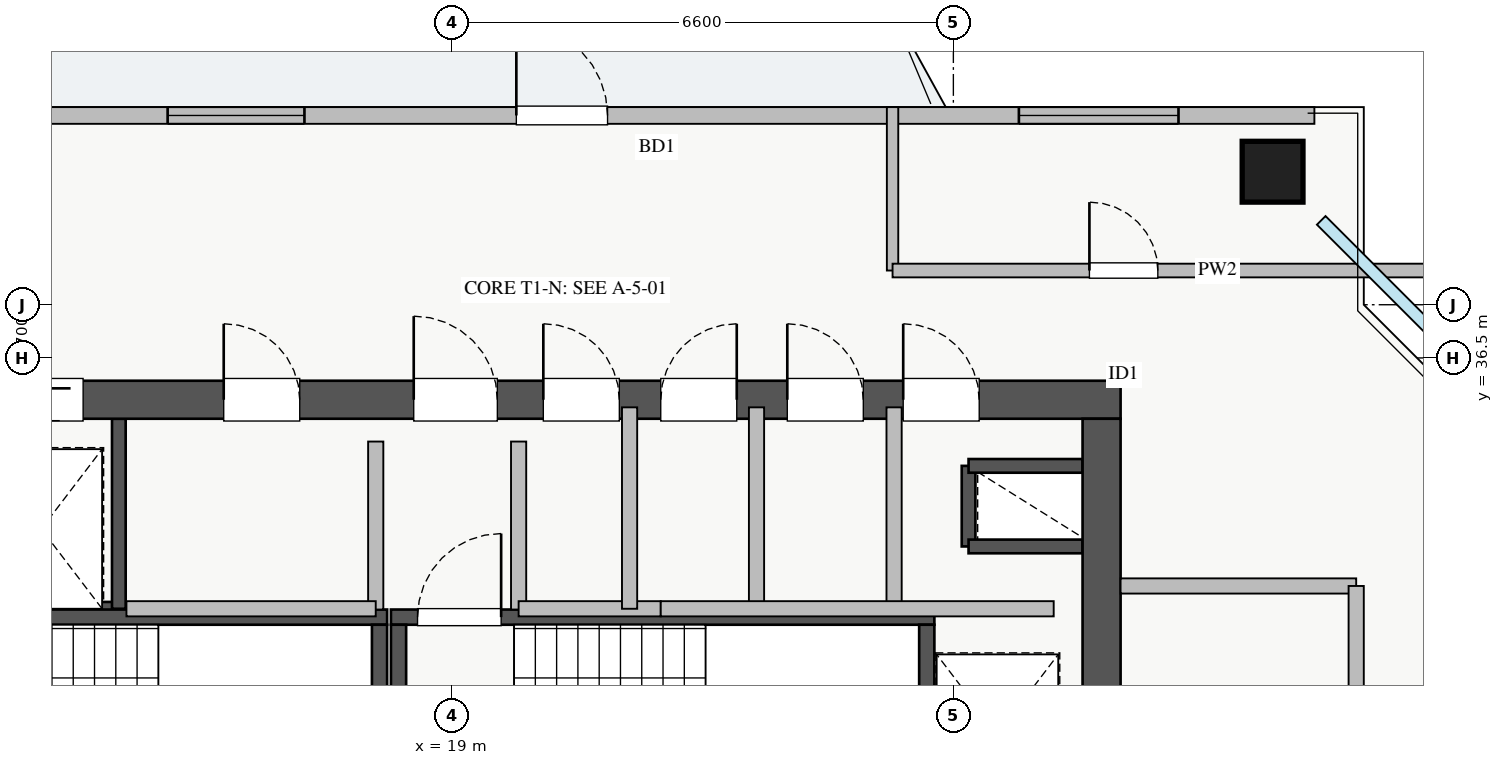
"""IFC4 building model, lengths in metres.
Left out: names, types, materials, properties, quantities, classifications, styles, units other than length and angle.
Written with IfcOpenShell. Run it as: python <this file> out.ifc"""

import sys

from ifc_helpers import new_model, si_unit, direction, frame, frame_2d, origin, origin_2d, place, context, subcontext, project, spatial, rectangle, extrude, source, transform, mapped, element, fill, save


model = new_model("IFC4")
c1 = context("Model", 3, precision=1e-05, world=origin(), true_north=direction((0.0, 1.0)))
c2 = subcontext(c1, "Body", "Model", "MODEL_VIEW")
j1 = project(units=[si_unit("LENGTHUNIT", "METRE"), si_unit("PLANEANGLEUNIT", "RADIAN")], contexts=[c1])
p1 = place(None, origin())
s1 = spatial("IfcSite", under=j1, at=p1, CompositionType="ELEMENT")
p2 = place(p1, origin())
s2 = spatial("IfcBuilding", under=s1, at=p2, CompositionType="ELEMENT")
p3 = place(p2, frame((0.0, 0.0, 203.5)))
s3 = spatial("IfcBuildingStorey", under=s2, at=p3, CompositionType="ELEMENT", Elevation=203.5)
p4 = place(p3, frame((12.68, 33.2, 0.0), z_axis=(0.0, 0.0, 1.0), x_axis=(1.0, 0.0, 0.0)))
e1 = element("IfcWall", 1, at=p4, inside=s3, PredefinedType="SHEAR", context=c2, shape_type="SweptSolid", body=[
    extrude(rectangle(XDim=1.94, YDim=0.18, at=frame_2d((0.97, 0.0))), origin(), (0.0, 0.0, 1.0), 3.07),
])
p5 = place(p3, frame((14.62, 33.2, 0.0), z_axis=(0.0, 0.0, 1.0), x_axis=(0.0, 1.0, 0.0)))
e2 = element("IfcWall", 2, at=p5, inside=s3, PredefinedType="SHEAR", context=c2, shape_type="SweptSolid", body=[
    extrude(rectangle(XDim=2.5, YDim=0.18, at=frame_2d((1.25, 0.0))), origin(), (0.0, 0.0, 1.0), 3.07),
])
p6 = place(p3, frame((25.8, 34.02, 0.0), z_axis=(0.0, 0.0, 1.0), x_axis=(0.0, 1.0, 0.0)))
e3 = element("IfcWall", 3, at=p6, inside=s3, PredefinedType="SHEAR", context=c2, shape_type="SweptSolid", body=[
    extrude(rectangle(XDim=1.06, YDim=0.18, at=frame_2d((0.53, 0.0))), origin(), (0.0, 0.0, 1.0), 3.07),
])
for number, where, z_axis, x_axis in (
    (4, (25.8, 35.08, 0.0), (0.0, 0.0, 1.0), (1.0, 0.0, 0.0)),
    (5, (25.8, 34.02, 0.0), (0.0, 0.0, 1.0), (1.0, 0.0, 0.0)),
):
    element("IfcWall", number, at=place(p3, frame(where, z_axis=z_axis, x_axis=x_axis)), inside=s3, PredefinedType="SHEAR", context=c2, shape_type="SweptSolid", body=[
        extrude(rectangle(XDim=1.5, YDim=0.18, at=frame_2d((0.75, 0.0))), origin(), (0.0, 0.0, 1.0), 3.07),
    ])
p7 = place(p3, frame((10.7, 33.09, 0.0), z_axis=(0.0, 0.0, 1.0), x_axis=(1.0, 0.0, 0.0)))
e6 = element("IfcWall", 6, at=p7, inside=s3, PredefinedType="SHEAR", context=c2, shape_type="SweptSolid", body=[
    extrude(rectangle(XDim=7.45, YDim=0.2, at=frame_2d((3.725, 0.0))), origin(), (0.0, 0.0, 1.0), 3.25),
])
p8 = place(p7, frame((0.35, 0.0, 0.0)))
e7 = element("IfcOpeningElement", 7, at=p8, cuts=e6, PredefinedType="OPENING", context=c2, shape_type="SweptSolid", body=[
    extrude(rectangle(XDim=1.1, YDim=2.05, at=frame_2d((0.55, 1.025))), frame((0.0, 0.11, 0.0), z_axis=(0.0, -1.0, 0.0), x_axis=(1.0, 0.0, 0.0)), (0.0, 0.0, 1.0), 0.22),
])
p9 = place(p3, frame((18.05, 30.05, 0.0), z_axis=(0.0, 0.0, 1.0), x_axis=(0.0, 1.0, 0.0)))
e8 = element("IfcWall", 8, at=p9, inside=s3, PredefinedType="SHEAR", context=c2, shape_type="SweptSolid", body=[
    extrude(rectangle(XDim=2.94, YDim=0.2, at=frame_2d((1.47, 0.0))), origin(), (0.0, 0.0, 1.0), 3.25),
])
p10 = place(p3, frame((18.2, 33.09, 0.0), z_axis=(0.0, 0.0, 1.0), x_axis=(1.0, 0.0, 0.0)))
e9 = element("IfcWall", 9, at=p10, inside=s3, PredefinedType="SHEAR", context=c2, shape_type="SweptSolid", body=[
    extrude(rectangle(XDim=7.15, YDim=0.2, at=frame_2d((3.575, 0.0))), origin(), (0.0, 0.0, 1.0), 3.25),
])
p11 = place(p10, frame((0.35, 0.0, 0.0)))
e10 = element("IfcOpeningElement", 10, at=p11, cuts=e9, PredefinedType="OPENING", context=c2, shape_type="SweptSolid", body=[
    extrude(rectangle(XDim=1.1, YDim=2.05, at=frame_2d((0.55, 1.025))), frame((0.0, 0.11, 0.0), z_axis=(0.0, -1.0, 0.0), x_axis=(1.0, 0.0, 0.0)), (0.0, 0.0, 1.0), 0.22),
])
for number, where, z_axis, x_axis in (
    (11, (18.3, 30.05, 0.0), (0.0, 0.0, 1.0), (0.0, 1.0, 0.0)),
    (12, (25.25, 30.05, 0.0), (0.0, 0.0, 1.0), (0.0, 1.0, 0.0)),
):
    element("IfcWall", number, at=place(p3, frame(where, z_axis=z_axis, x_axis=x_axis)), inside=s3, PredefinedType="SHEAR", context=c2, shape_type="SweptSolid", body=[
        extrude(rectangle(XDim=2.94, YDim=0.2, at=frame_2d((1.47, 0.0))), origin(), (0.0, 0.0, 1.0), 3.25),
    ])
p12 = place(p3, frame((10.2, 35.95, 0.0), z_axis=(0.0, 0.0, 1.0), x_axis=(1.0, 0.0, 0.0)))
e13 = element("IfcWall", 13, at=p12, inside=s3, PredefinedType="SHEAR", context=c2, shape_type="SweptSolid", body=[
    extrude(rectangle(XDim=17.6, YDim=0.5, at=frame_2d((8.8, 0.0))), origin(), (0.0, 0.0, 1.0), 3.25),
])
p13 = place(p12, frame((1.15, 0.0, 0.0)))
e14 = element("IfcOpeningElement", 14, at=p13, cuts=e13, PredefinedType="OPENING", context=c2, shape_type="SweptSolid", body=[
    extrude(rectangle(XDim=1.1, YDim=2.05, at=frame_2d((0.55, 1.025))), frame((0.0, 0.26, 0.0), z_axis=(0.0, -1.0, 0.0), x_axis=(1.0, 0.0, 0.0)), (0.0, 0.0, 1.0), 0.52),
])
p14 = place(p12, frame((8.3, 0.0, 0.0)))
e15 = element("IfcOpeningElement", 15, at=p14, cuts=e13, PredefinedType="OPENING", context=c2, shape_type="SweptSolid", body=[
    extrude(rectangle(XDim=1.1, YDim=2.05, at=frame_2d((0.55, 1.025))), frame((0.0, 0.26, 0.0), z_axis=(0.0, -1.0, 0.0), x_axis=(1.0, 0.0, 0.0)), (0.0, 0.0, 1.0), 0.52),
])
p15 = place(p12, frame((2.85, 0.0, 0.0)))
e16 = element("IfcOpeningElement", 16, at=p15, cuts=e13, PredefinedType="OPENING", context=c2, shape_type="SweptSolid", body=[
    extrude(rectangle(XDim=1.1, YDim=2.05, at=frame_2d((0.55, 1.025))), frame((0.0, 0.26, 0.0), z_axis=(0.0, -1.0, 0.0), x_axis=(1.0, 0.0, 0.0)), (0.0, 0.0, 1.0), 0.52),
])
p16 = place(p12, frame((5.8, 0.0, 0.0)))
e17 = element("IfcOpeningElement", 17, at=p16, cuts=e13, PredefinedType="OPENING", context=c2, shape_type="SweptSolid", body=[
    extrude(rectangle(XDim=1.0, YDim=2.05, at=frame_2d((0.5, 1.025))), frame((0.0, 0.26, 0.0), z_axis=(0.0, -1.0, 0.0), x_axis=(1.0, 0.0, 0.0)), (0.0, 0.0, 1.0), 0.52),
])
p17 = place(p12, frame((14.74, 0.0, 0.0)))
e18 = element("IfcOpeningElement", 18, at=p17, cuts=e13, PredefinedType="OPENING", context=c2, shape_type="SweptSolid", body=[
    extrude(rectangle(XDim=1.0, YDim=2.05, at=frame_2d((0.5, 1.025))), frame((0.0, 0.26, 0.0), z_axis=(0.0, -1.0, 0.0), x_axis=(1.0, 0.0, 0.0)), (0.0, 0.0, 1.0), 0.52),
])
p18 = place(p12, frame((10.005, 0.0, 0.0)))
e19 = element("IfcOpeningElement", 19, at=p18, cuts=e13, PredefinedType="OPENING", context=c2, shape_type="SweptSolid", body=[
    extrude(rectangle(XDim=1.0, YDim=2.05, at=frame_2d((0.5, 1.025))), frame((0.0, 0.26, 0.0), z_axis=(0.0, -1.0, 0.0), x_axis=(1.0, 0.0, 0.0)), (0.0, 0.0, 1.0), 0.52),
])
p19 = place(p12, frame((11.55, 0.0, 0.0)))
e20 = element("IfcOpeningElement", 20, at=p19, cuts=e13, PredefinedType="OPENING", context=c2, shape_type="SweptSolid", body=[
    extrude(rectangle(XDim=1.0, YDim=2.05, at=frame_2d((0.5, 1.025))), frame((0.0, 0.26, 0.0), z_axis=(0.0, -1.0, 0.0), x_axis=(1.0, 0.0, 0.0)), (0.0, 0.0, 1.0), 0.52),
])
p20 = place(p12, frame((13.215, 0.0, 0.0)))
e21 = element("IfcOpeningElement", 21, at=p20, cuts=e13, PredefinedType="OPENING", context=c2, shape_type="SweptSolid", body=[
    extrude(rectangle(XDim=1.0, YDim=2.05, at=frame_2d((0.5, 1.025))), frame((0.0, 0.26, 0.0), z_axis=(0.0, -1.0, 0.0), x_axis=(1.0, 0.0, 0.0)), (0.0, 0.0, 1.0), 0.52),
])
p21 = place(p3, frame((27.55, 29.5, 0.0), z_axis=(0.0, 0.0, 1.0), x_axis=(0.0, 1.0, 0.0)))
e22 = element("IfcWall", 22, at=p21, inside=s3, PredefinedType="SHEAR", context=c2, shape_type="SweptSolid", body=[
    extrude(rectangle(XDim=6.2, YDim=0.5, at=frame_2d((3.1, 0.0))), origin(), (0.0, 0.0, 1.0), 3.25),
])
p22 = place(p21, frame((1.1, 0.0, 0.0)))
e23 = element("IfcOpeningElement", 23, at=p22, cuts=e22, PredefinedType="OPENING", context=c2, shape_type="SweptSolid", body=[
    extrude(rectangle(XDim=1.3, YDim=2.05, at=frame_2d((0.65, 1.025))), frame((0.0, 0.26, 0.0), z_axis=(0.0, -1.0, 0.0), x_axis=(1.0, 0.0, 0.0)), (0.0, 0.0, 1.0), 0.52),
])
m1 = source(origin(), c2, "Body", "SweptSolid", [
    extrude(rectangle(XDim=0.8, YDim=0.8, at=origin_2d()), origin(), (0.0, 0.0, 1.0), 3.25),
])
p23 = place(p3, frame((29.8, 38.95, 0.0), z_axis=(0.0, 0.0, 1.0), x_axis=(1.0, 0.0, 0.0)))
e24 = element("IfcColumn", 24, at=p23, inside=s3, PredefinedType="COLUMN", context=c2, shape_type="MappedRepresentation", body=[
    mapped(m1, transform((0.0, 0.0, 0.0), x_axis=(1.0, 0.0, 0.0), y_axis=(0.0, 1.0, 0.0), z_axis=(0.0, 0.0, 1.0), scale=1.0)),
])
p24 = place(p3, frame((7.65, 39.69, 0.0), z_axis=(0.0, 0.0, 1.0), x_axis=(1.0, 0.0, 0.0)))
e25 = element("IfcWall", 25, at=p24, inside=s3, PredefinedType="STANDARD", context=c2, shape_type="SweptSolid", body=[
    extrude(rectangle(XDim=22.7, YDim=0.22, at=frame_2d((11.35, 0.0))), origin(), (0.0, 0.0, 1.0), 2.61),
])
p25 = place(p24, frame((12.2, 0.0, 0.0)))
e26 = element("IfcOpeningElement", 26, at=p25, cuts=e25, PredefinedType="OPENING", context=c2, shape_type="SweptSolid", body=[
    extrude(rectangle(XDim=1.2, YDim=2.1, at=frame_2d((0.6, 1.05))), frame((0.0, 0.12, 0.0), z_axis=(0.0, -1.0, 0.0), x_axis=(1.0, 0.0, 0.0)), (0.0, 0.0, 1.0), 0.24),
])
p26 = place(p24, frame((1.637, 0.0, 0.9)))
e27 = element("IfcOpeningElement", 27, at=p26, cuts=e25, PredefinedType="OPENING", context=c2, shape_type="SweptSolid", body=[
    extrude(rectangle(XDim=2.4, YDim=1.48, at=frame_2d((1.2, 0.74))), frame((0.0, 0.12, 0.0), z_axis=(0.0, -1.0, 0.0), x_axis=(1.0, 0.0, 0.0)), (0.0, 0.0, 1.0), 0.24),
])
p27 = place(p24, frame((7.612, 0.0, 0.9)))
e28 = element("IfcOpeningElement", 28, at=p27, cuts=e25, PredefinedType="OPENING", context=c2, shape_type="SweptSolid", body=[
    extrude(rectangle(XDim=1.8, YDim=1.45, at=frame_2d((0.9, 0.725))), frame((0.0, 0.12, 0.0), z_axis=(0.0, -1.0, 0.0), x_axis=(1.0, 0.0, 0.0)), (0.0, 0.0, 1.0), 0.24),
])
p28 = place(p24, frame((18.812, 0.0, 0.9)))
e29 = element("IfcOpeningElement", 29, at=p28, cuts=e25, PredefinedType="OPENING", context=c2, shape_type="SweptSolid", body=[
    extrude(rectangle(XDim=2.1, YDim=1.48, at=frame_2d((1.05, 0.74))), frame((0.0, 0.12, 0.0), z_axis=(0.0, -1.0, 0.0), x_axis=(1.0, 0.0, 0.0)), (0.0, 0.0, 1.0), 0.24),
])
p29 = place(p3, frame((27.8, 33.5, 0.0), z_axis=(0.0, 0.0, 1.0), x_axis=(1.0, 0.0, 0.0)))
e30 = element("IfcWall", 30, at=p29, inside=s3, PredefinedType="PARTITIONING", context=c2, shape_type="SweptSolid", body=[
    extrude(rectangle(XDim=3.1, YDim=0.2, at=frame_2d((1.55, 0.0))), origin(), (0.0, 0.0, 1.0), 2.265),
])
p30 = place(p3, frame((30.9, 29.6, 0.0), z_axis=(0.0, 0.0, 1.0), x_axis=(0.0, 1.0, 0.0)))
e31 = element("IfcWall", 31, at=p30, inside=s3, PredefinedType="PARTITIONING", context=c2, shape_type="SweptSolid", body=[
    extrude(rectangle(XDim=3.9, YDim=0.2, at=frame_2d((1.95, 0.0))), origin(), (0.0, 0.0, 1.0), 3.07),
])
p31 = place(p30, frame((1.4, 0.0, 0.0)))
e32 = element("IfcOpeningElement", 32, at=p31, cuts=e31, PredefinedType="OPENING", context=c2, shape_type="SweptSolid", body=[
    extrude(rectangle(XDim=1.1, YDim=2.05, at=frame_2d((0.55, 1.025))), frame((0.0, 0.11, 0.0), z_axis=(0.0, -1.0, 0.0), x_axis=(1.0, 0.0, 0.0)), (0.0, 0.0, 1.0), 0.22),
])
for number, where, z_axis, x_axis in (
    (33, (18.0, 33.19, 0.0), (0.0, 0.0, 1.0), (0.0, 1.0, 0.0)),
    (34, (19.88, 33.19, 0.0), (0.0, 0.0, 1.0), (0.0, 1.0, 0.0)),
):
    element("IfcWall", number, at=place(p3, frame(where, z_axis=z_axis, x_axis=x_axis)), inside=s3, PredefinedType="PARTITIONING", context=c2, shape_type="SweptSolid", body=[
        extrude(rectangle(XDim=2.21, YDim=0.2, at=frame_2d((1.105, 0.0))), origin(), (0.0, 0.0, 1.0), 3.07),
    ])
p32 = place(p3, frame((14.72, 33.2, 0.0), z_axis=(0.0, 0.0, 1.0), x_axis=(1.0, 0.0, 0.0)))
e35 = element("IfcWall", 35, at=p32, inside=s3, PredefinedType="PARTITIONING", context=c2, shape_type="SweptSolid", body=[
    extrude(rectangle(XDim=3.28, YDim=0.2, at=frame_2d((1.64, 0.0))), origin(), (0.0, 0.0, 1.0), 3.07),
])
p33 = place(p3, frame((24.82, 33.2, 0.0), z_axis=(0.0, 0.0, 1.0), x_axis=(0.0, 1.0, 0.0)))
e36 = element("IfcWall", 36, at=p33, inside=s3, PredefinedType="PARTITIONING", context=c2, shape_type="SweptSolid", body=[
    extrude(rectangle(XDim=2.65, YDim=0.2, at=frame_2d((1.325, 0.0))), origin(), (0.0, 0.0, 1.0), 3.07),
])
p34 = place(p3, frame((19.88, 33.2, 0.0), z_axis=(0.0, 0.0, 1.0), x_axis=(1.0, 0.0, 0.0)))
e37 = element("IfcWall", 37, at=p34, inside=s3, PredefinedType="PARTITIONING", context=c2, shape_type="SweptSolid", body=[
    extrude(rectangle(XDim=1.87, YDim=0.2, at=frame_2d((0.935, 0.0))), origin(), (0.0, 0.0, 1.0), 3.07),
])
for number, where, z_axis, x_axis in (
    (38, (21.34, 33.2, 0.0), (0.0, 0.0, 1.0), (0.0, 1.0, 0.0)),
    (39, (23.01, 33.2, 0.0), (0.0, 0.0, 1.0), (0.0, 1.0, 0.0)),
):
    element("IfcWall", number, at=place(p3, frame(where, z_axis=z_axis, x_axis=x_axis)), inside=s3, PredefinedType="PARTITIONING", context=c2, shape_type="SweptSolid", body=[
        extrude(rectangle(XDim=2.65, YDim=0.2, at=frame_2d((1.325, 0.0))), origin(), (0.0, 0.0, 1.0), 3.07),
    ])
p35 = place(p3, frame((21.75, 33.2, 0.0), z_axis=(0.0, 0.0, 1.0), x_axis=(1.0, 0.0, 0.0)))
e40 = element("IfcWall", 40, at=p35, inside=s3, PredefinedType="PARTITIONING", context=c2, shape_type="SweptSolid", body=[
    extrude(rectangle(XDim=5.17, YDim=0.2, at=frame_2d((2.585, 0.0))), origin(), (0.0, 0.0, 1.0), 3.07),
])
p36 = place(p3, frame((24.8, 37.65, 0.0), z_axis=(0.0, 0.0, 1.0), x_axis=(0.0, 1.0, 0.0)))
e41 = element("IfcWall", 41, at=p36, inside=s3, PredefinedType="PARTITIONING", context=c2, shape_type="SweptSolid", body=[
    extrude(rectangle(XDim=2.15, YDim=0.15, at=frame_2d((1.075, 0.0))), origin(), (0.0, 0.0, 1.0), 3.07),
])
p37 = place(p3, frame((24.8, 37.65, 0.0), z_axis=(0.0, 0.0, 1.0), x_axis=(1.0, 0.0, 0.0)))
e42 = element("IfcWall", 42, at=p37, inside=s3, PredefinedType="PARTITIONING", context=c2, shape_type="SweptSolid", body=[
    extrude(rectangle(XDim=7.65, YDim=0.18, at=frame_2d((3.825, 0.0))), origin(), (0.0, 0.0, 1.0), 3.07),
])
p38 = place(p37, frame((2.59, 0.0, 0.0)))
e43 = element("IfcOpeningElement", 43, at=p38, cuts=e42, PredefinedType="OPENING", context=c2, shape_type="SweptSolid", body=[
    extrude(rectangle(XDim=0.9, YDim=2.05, at=frame_2d((0.45, 1.025))), frame((0.0, 0.1, 0.0), z_axis=(0.0, -1.0, 0.0), x_axis=(1.0, 0.0, 0.0)), (0.0, 0.0, 1.0), 0.2),
])
m2 = source(origin(), c2, "Body", "SweptSolid", [
    extrude(rectangle(XDim=1.2, YDim=2.1, at=frame_2d((0.6, 1.05))), frame((0.0, 0.025, 0.0), z_axis=(0.0, -1.0, 0.0), x_axis=(1.0, 0.0, 0.0)), (0.0, 0.0, 1.0), 0.05),
])
p39 = place(p25, origin())
e44 = element("IfcDoor", 44, at=p39, inside=s3, OperationType="SINGLE_SWING_LEFT", PredefinedType="DOOR", context=c2, shape_type="MappedRepresentation", body=[
    mapped(m2, transform((0.0, 0.0, 0.0), x_axis=(1.0, 0.0, 0.0), y_axis=(0.0, 1.0, 0.0), z_axis=(0.0, 0.0, 1.0), scale=1.0)),
])
fill(e26, e44)
m3 = source(origin(), c2, "Body", "SweptSolid", [
    extrude(rectangle(XDim=1.8, YDim=1.45, at=frame_2d((0.9, 0.725))), frame((0.0, 0.03, 0.0), z_axis=(0.0, -1.0, 0.0), x_axis=(1.0, 0.0, 0.0)), (0.0, 0.0, 1.0), 0.06),
])
p40 = place(p27, origin())
e45 = element("IfcWindow", 45, at=p40, inside=s3, PartitioningType="DOUBLE_PANEL_VERTICAL", PredefinedType="WINDOW", context=c2, shape_type="MappedRepresentation", body=[
    mapped(m3, transform((0.0, 0.0, 0.0), x_axis=(1.0, 0.0, 0.0), y_axis=(0.0, 1.0, 0.0), z_axis=(0.0, 0.0, 1.0), scale=1.0)),
])
fill(e28, e45)
m4 = source(origin(), c2, "Body", "SweptSolid", [
    extrude(rectangle(XDim=2.1, YDim=1.48, at=frame_2d((1.05, 0.74))), frame((0.0, 0.03, 0.0), z_axis=(0.0, -1.0, 0.0), x_axis=(1.0, 0.0, 0.0)), (0.0, 0.0, 1.0), 0.06),
])
p41 = place(p28, origin())
e46 = element("IfcWindow", 46, at=p41, inside=s3, PartitioningType="TRIPLE_PANEL_VERTICAL", PredefinedType="WINDOW", context=c2, shape_type="MappedRepresentation", body=[
    mapped(m4, transform((0.0, 0.0, 0.0), x_axis=(1.0, 0.0, 0.0), y_axis=(0.0, 1.0, 0.0), z_axis=(0.0, 0.0, 1.0), scale=1.0)),
])
fill(e29, e46)
m5 = source(origin(), c2, "Body", "SweptSolid", [
    extrude(rectangle(XDim=1.1, YDim=2.05, at=frame_2d((0.55, 1.025))), frame((0.0, 0.025, 0.0), z_axis=(0.0, -1.0, 0.0), x_axis=(1.0, 0.0, 0.0)), (0.0, 0.0, 1.0), 0.05),
])
p42 = place(p14, origin())
e47 = element("IfcDoor", 47, at=p42, inside=s3, OperationType="SINGLE_SWING_LEFT", PredefinedType="DOOR", context=c2, shape_type="MappedRepresentation", body=[
    mapped(m5, transform((0.0, 0.0, 0.0), x_axis=(1.0, 0.0, 0.0), y_axis=(0.0, 1.0, 0.0), z_axis=(0.0, 0.0, 1.0), scale=1.0)),
])
fill(e15, e47)
p43 = place(p11, origin())
e48 = element("IfcDoor", 48, at=p43, inside=s3, OperationType="SINGLE_SWING_RIGHT", PredefinedType="DOOR", context=c2, shape_type="MappedRepresentation", body=[
    mapped(m5, transform((0.0, 0.0, 0.0), x_axis=(1.0, 0.0, 0.0), y_axis=(0.0, 1.0, 0.0), z_axis=(0.0, 0.0, 1.0), scale=1.0)),
])
fill(e10, e48)
p44 = place(p15, origin())
e49 = element("IfcDoor", 49, at=p44, inside=s3, OperationType="SLIDING_TO_LEFT", PredefinedType="DOOR", context=c2, shape_type="MappedRepresentation", body=[
    mapped(m5, transform((0.0, 0.0, 0.0), x_axis=(1.0, 0.0, 0.0), y_axis=(0.0, 1.0, 0.0), z_axis=(0.0, 0.0, 1.0), scale=1.0)),
])
fill(e16, e49)
m6 = source(origin(), c2, "Body", "SweptSolid", [
    extrude(rectangle(XDim=1.0, YDim=2.05, at=frame_2d((0.5, 1.025))), frame((0.0, 0.025, 0.0), z_axis=(0.0, -1.0, 0.0), x_axis=(1.0, 0.0, 0.0)), (0.0, 0.0, 1.0), 0.05),
])
p45 = place(p16, origin())
e50 = element("IfcDoor", 50, at=p45, inside=s3, OperationType="SINGLE_SWING_LEFT", PredefinedType="DOOR", context=c2, shape_type="MappedRepresentation", body=[
    mapped(m6, transform((0.0, 0.0, 0.0), x_axis=(1.0, 0.0, 0.0), y_axis=(0.0, 1.0, 0.0), z_axis=(0.0, 0.0, 1.0), scale=1.0)),
])
fill(e17, e50)
p46 = place(p17, origin())
e51 = element("IfcDoor", 51, at=p46, inside=s3, OperationType="SINGLE_SWING_LEFT", PredefinedType="DOOR", context=c2, shape_type="MappedRepresentation", body=[
    mapped(m6, transform((0.0, 0.0, 0.0), x_axis=(1.0, 0.0, 0.0), y_axis=(0.0, 1.0, 0.0), z_axis=(0.0, 0.0, 1.0), scale=1.0)),
])
fill(e18, e51)
p47 = place(p18, origin())
e52 = element("IfcDoor", 52, at=p47, inside=s3, OperationType="SINGLE_SWING_LEFT", PredefinedType="DOOR", context=c2, shape_type="MappedRepresentation", body=[
    mapped(m6, transform((0.0, 0.0, 0.0), x_axis=(1.0, 0.0, 0.0), y_axis=(0.0, 1.0, 0.0), z_axis=(0.0, 0.0, 1.0), scale=1.0)),
])
fill(e19, e52)
p48 = place(p19, origin())
e53 = element("IfcDoor", 53, at=p48, inside=s3, OperationType="SINGLE_SWING_RIGHT", PredefinedType="DOOR", context=c2, shape_type="MappedRepresentation", body=[
    mapped(m6, transform((0.0, 0.0, 0.0), x_axis=(1.0, 0.0, 0.0), y_axis=(0.0, 1.0, 0.0), z_axis=(0.0, 0.0, 1.0), scale=1.0)),
])
fill(e20, e53)
p49 = place(p20, origin())
e54 = element("IfcDoor", 54, at=p49, inside=s3, OperationType="SINGLE_SWING_LEFT", PredefinedType="DOOR", context=c2, shape_type="MappedRepresentation", body=[
    mapped(m6, transform((0.0, 0.0, 0.0), x_axis=(1.0, 0.0, 0.0), y_axis=(0.0, 1.0, 0.0), z_axis=(0.0, 0.0, 1.0), scale=1.0)),
])
fill(e21, e54)
m7 = source(origin(), c2, "Body", "SweptSolid", [
    extrude(rectangle(XDim=0.9, YDim=2.05, at=frame_2d((0.45, 1.025))), frame((0.0, 0.025, 0.0), z_axis=(0.0, -1.0, 0.0), x_axis=(1.0, 0.0, 0.0)), (0.0, 0.0, 1.0), 0.05),
])
p50 = place(p38, origin())
e55 = element("IfcDoor", 55, at=p50, inside=s3, OperationType="SINGLE_SWING_LEFT", PredefinedType="DOOR", context=c2, shape_type="MappedRepresentation", body=[
    mapped(m7, transform((0.0, 0.0, 0.0), x_axis=(1.0, 0.0, 0.0), y_axis=(0.0, 1.0, 0.0), z_axis=(0.0, 0.0, 1.0), scale=1.0)),
])
fill(e43, e55)
save(model, sys.argv[1])
